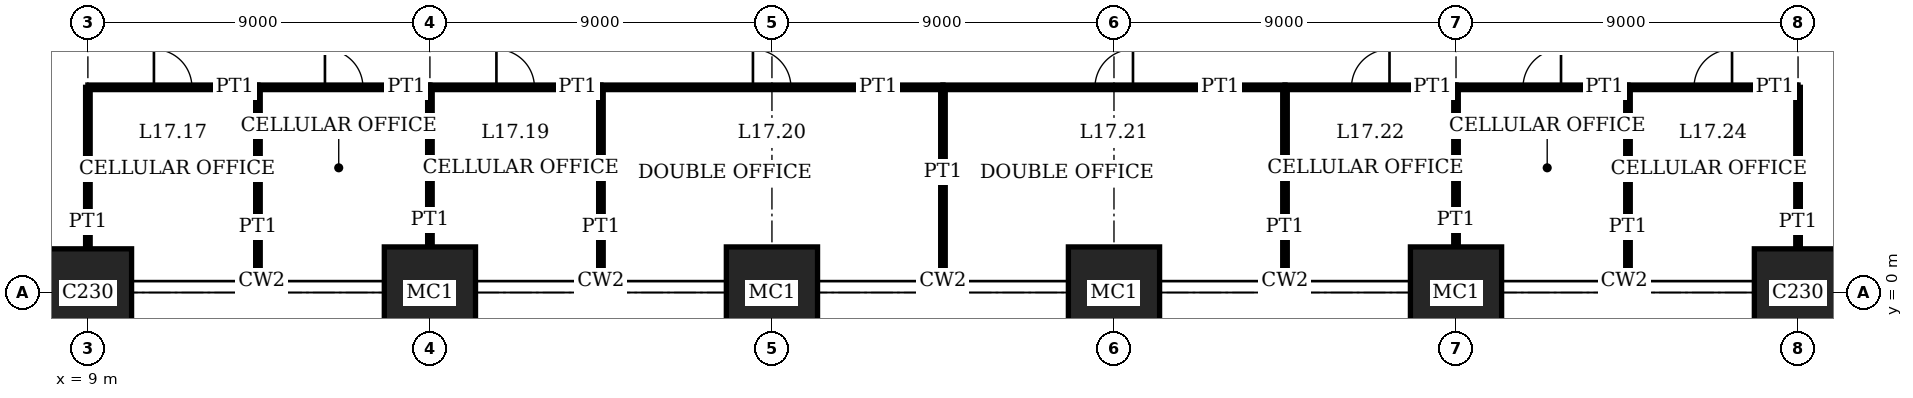
"""IFC4 building model, lengths in metres.
Left out: names, types, materials, properties, quantities, classifications, styles, units other than length and angle.
Written with IfcOpenShell. Run it as: python <this file> out.ifc"""

import sys

from ifc_helpers import new_model, si_unit, direction, frame, frame_2d, origin, origin_2d, place, context, subcontext, project, spatial, rectangle, extrude, element, fill, save


model = new_model("IFC4")
c1 = context("Model", 3, precision=1e-05, world=origin(), true_north=direction((0.0, 1.0)))
c2 = subcontext(c1, "Body", "Model", "MODEL_VIEW")
j1 = project(units=[si_unit("LENGTHUNIT", "METRE"), si_unit("PLANEANGLEUNIT", "RADIAN")], contexts=[c1])
p1 = place(None, origin())
s1 = spatial("IfcSite", under=j1, at=p1, CompositionType="ELEMENT")
p2 = place(p1, origin())
s2 = spatial("IfcBuilding", under=s1, at=p2, CompositionType="ELEMENT")
p3 = place(p2, frame((0.0, 0.0, 71.8)))
s3 = spatial("IfcBuildingStorey", under=s2, at=p3, CompositionType="ELEMENT", Elevation=71.8)
p4 = place(p3, frame((9.0, 0.0, 0.0), z_axis=(0.0, 0.0, 1.0), x_axis=(1.0, 0.0, 0.0)))
e1 = element("IfcColumn", 1, at=p4, inside=s3, PredefinedType="COLUMN", context=c2, shape_type="SweptSolid", body=[
    extrude(rectangle(XDim=2.3, YDim=2.3, at=origin_2d()), origin(), (0.0, 0.0, 1.0), 4.0),
])
for number, where, z_axis, x_axis in (
    (2, (18.0, 0.0, 0.0), (0.0, 0.0, 1.0), (1.0, 0.0, 0.0)),
    (3, (27.0, 0.0, 0.0), (0.0, 0.0, 1.0), (1.0, 0.0, 0.0)),
    (4, (36.0, 0.0, 0.0), (0.0, 0.0, 1.0), (1.0, 0.0, 0.0)),
    (5, (45.0, 0.0, 0.0), (0.0, 0.0, 1.0), (1.0, 0.0, 0.0)),
):
    element("IfcColumn", number, at=place(p3, frame(where, z_axis=z_axis, x_axis=x_axis)), inside=s3, PredefinedType="COLUMN", context=c2, shape_type="SweptSolid", body=[
        extrude(rectangle(XDim=2.4, YDim=2.4, at=origin_2d()), origin(), (0.0, 0.0, 1.0), 4.0),
    ])
p5 = place(p3, frame((54.0, 0.0, 0.0), z_axis=(0.0, 0.0, 1.0), x_axis=(1.0, 0.0, 0.0)))
e6 = element("IfcColumn", 6, at=p5, inside=s3, PredefinedType="COLUMN", context=c2, shape_type="SweptSolid", body=[
    extrude(rectangle(XDim=2.3, YDim=2.3, at=origin_2d()), origin(), (0.0, 0.0, 1.0), 4.0),
])
p6 = place(p3, frame((9.0, 5.4, 0.0), z_axis=(0.0, 0.0, 1.0), x_axis=(1.0, 0.0, 0.0)))
e7 = element("IfcWall", 7, at=p6, inside=s3, PredefinedType="PARTITIONING", context=c2, shape_type="SweptSolid", body=[
    extrude(rectangle(XDim=4.475, YDim=0.12, at=frame_2d((2.238, 0.0))), origin(), (0.0, 0.0, 1.0), 3.75),
])
p7 = place(p6, frame((1.738, 0.0, 0.0)))
e8 = element("IfcOpeningElement", 8, at=p7, cuts=e7, PredefinedType="OPENING", context=c2, shape_type="SweptSolid", body=[
    extrude(rectangle(XDim=1.0, YDim=2.4, at=frame_2d((0.5, 1.2))), frame((0.0, 0.07, 0.0), z_axis=(0.0, -1.0, 0.0), x_axis=(1.0, 0.0, 0.0)), (0.0, 0.0, 1.0), 0.14),
])
p8 = place(p3, frame((13.475, 5.4, 0.0), z_axis=(0.0, 0.0, 1.0), x_axis=(1.0, 0.0, 0.0)))
e9 = element("IfcWall", 9, at=p8, inside=s3, PredefinedType="PARTITIONING", context=c2, shape_type="SweptSolid", body=[
    extrude(rectangle(XDim=4.525, YDim=0.12, at=frame_2d((2.262, 0.0))), origin(), (0.0, 0.0, 1.0), 3.75),
])
p9 = place(p8, frame((1.763, 0.0, 0.0)))
e10 = element("IfcOpeningElement", 10, at=p9, cuts=e9, PredefinedType="OPENING", context=c2, shape_type="SweptSolid", body=[
    extrude(rectangle(XDim=1.0, YDim=2.4, at=frame_2d((0.5, 1.2))), frame((0.0, 0.07, 0.0), z_axis=(0.0, -1.0, 0.0), x_axis=(1.0, 0.0, 0.0)), (0.0, 0.0, 1.0), 0.14),
])
p10 = place(p3, frame((18.0, 5.4, 0.0), z_axis=(0.0, 0.0, 1.0), x_axis=(1.0, 0.0, 0.0)))
e11 = element("IfcWall", 11, at=p10, inside=s3, PredefinedType="PARTITIONING", context=c2, shape_type="SweptSolid", body=[
    extrude(rectangle(XDim=4.5, YDim=0.12, at=frame_2d((2.25, 0.0))), origin(), (0.0, 0.0, 1.0), 3.75),
])
p11 = place(p10, frame((1.75, 0.0, 0.0)))
e12 = element("IfcOpeningElement", 12, at=p11, cuts=e11, PredefinedType="OPENING", context=c2, shape_type="SweptSolid", body=[
    extrude(rectangle(XDim=1.0, YDim=2.4, at=frame_2d((0.5, 1.2))), frame((0.0, 0.07, 0.0), z_axis=(0.0, -1.0, 0.0), x_axis=(1.0, 0.0, 0.0)), (0.0, 0.0, 1.0), 0.14),
])
p12 = place(p3, frame((22.5, 5.4, 0.0), z_axis=(0.0, 0.0, 1.0), x_axis=(1.0, 0.0, 0.0)))
e13 = element("IfcWall", 13, at=p12, inside=s3, PredefinedType="PARTITIONING", context=c2, shape_type="SweptSolid", body=[
    extrude(rectangle(XDim=9.0, YDim=0.12, at=frame_2d((4.5, 0.0))), origin(), (0.0, 0.0, 1.0), 3.75),
])
p13 = place(p12, frame((4.0, 0.0, 0.0)))
e14 = element("IfcOpeningElement", 14, at=p13, cuts=e13, PredefinedType="OPENING", context=c2, shape_type="SweptSolid", body=[
    extrude(rectangle(XDim=1.0, YDim=2.4, at=frame_2d((0.5, 1.2))), frame((0.0, 0.07, 0.0), z_axis=(0.0, -1.0, 0.0), x_axis=(1.0, 0.0, 0.0)), (0.0, 0.0, 1.0), 0.14),
])
p14 = place(p3, frame((31.5, 5.4, 0.0), z_axis=(0.0, 0.0, 1.0), x_axis=(1.0, 0.0, 0.0)))
e15 = element("IfcWall", 15, at=p14, inside=s3, PredefinedType="PARTITIONING", context=c2, shape_type="SweptSolid", body=[
    extrude(rectangle(XDim=9.0, YDim=0.12, at=frame_2d((4.5, 0.0))), origin(), (0.0, 0.0, 1.0), 3.75),
])
p15 = place(p14, frame((4.0, 0.0, 0.0)))
e16 = element("IfcOpeningElement", 16, at=p15, cuts=e15, PredefinedType="OPENING", context=c2, shape_type="SweptSolid", body=[
    extrude(rectangle(XDim=1.0, YDim=2.4, at=frame_2d((0.5, 1.2))), frame((0.0, 0.07, 0.0), z_axis=(0.0, -1.0, 0.0), x_axis=(1.0, 0.0, 0.0)), (0.0, 0.0, 1.0), 0.14),
])
p16 = place(p3, frame((40.5, 5.4, 0.0), z_axis=(0.0, 0.0, 1.0), x_axis=(1.0, 0.0, 0.0)))
e17 = element("IfcWall", 17, at=p16, inside=s3, PredefinedType="PARTITIONING", context=c2, shape_type="SweptSolid", body=[
    extrude(rectangle(XDim=4.5, YDim=0.12, at=frame_2d((2.25, 0.0))), origin(), (0.0, 0.0, 1.0), 3.75),
])
p17 = place(p16, frame((1.75, 0.0, 0.0)))
e18 = element("IfcOpeningElement", 18, at=p17, cuts=e17, PredefinedType="OPENING", context=c2, shape_type="SweptSolid", body=[
    extrude(rectangle(XDim=1.0, YDim=2.4, at=frame_2d((0.5, 1.2))), frame((0.0, 0.07, 0.0), z_axis=(0.0, -1.0, 0.0), x_axis=(1.0, 0.0, 0.0)), (0.0, 0.0, 1.0), 0.14),
])
p18 = place(p3, frame((45.0, 5.4, 0.0), z_axis=(0.0, 0.0, 1.0), x_axis=(1.0, 0.0, 0.0)))
e19 = element("IfcWall", 19, at=p18, inside=s3, PredefinedType="PARTITIONING", context=c2, shape_type="SweptSolid", body=[
    extrude(rectangle(XDim=4.525, YDim=0.12, at=frame_2d((2.262, 0.0))), origin(), (0.0, 0.0, 1.0), 3.75),
])
p19 = place(p18, frame((1.763, 0.0, 0.0)))
e20 = element("IfcOpeningElement", 20, at=p19, cuts=e19, PredefinedType="OPENING", context=c2, shape_type="SweptSolid", body=[
    extrude(rectangle(XDim=1.0, YDim=2.4, at=frame_2d((0.5, 1.2))), frame((0.0, 0.07, 0.0), z_axis=(0.0, -1.0, 0.0), x_axis=(1.0, 0.0, 0.0)), (0.0, 0.0, 1.0), 0.14),
])
p20 = place(p3, frame((49.525, 5.4, 0.0), z_axis=(0.0, 0.0, 1.0), x_axis=(1.0, 0.0, 0.0)))
e21 = element("IfcWall", 21, at=p20, inside=s3, PredefinedType="PARTITIONING", context=c2, shape_type="SweptSolid", body=[
    extrude(rectangle(XDim=4.475, YDim=0.12, at=frame_2d((2.238, 0.0))), origin(), (0.0, 0.0, 1.0), 3.75),
])
p21 = place(p20, frame((1.738, 0.0, 0.0)))
e22 = element("IfcOpeningElement", 22, at=p21, cuts=e21, PredefinedType="OPENING", context=c2, shape_type="SweptSolid", body=[
    extrude(rectangle(XDim=1.0, YDim=2.4, at=frame_2d((0.5, 1.2))), frame((0.0, 0.07, 0.0), z_axis=(0.0, -1.0, 0.0), x_axis=(1.0, 0.0, 0.0)), (0.0, 0.0, 1.0), 0.14),
])
p22 = place(p3, frame((9.0, 1.15, 0.0), z_axis=(0.0, 0.0, 1.0), x_axis=(0.0, 1.0, 0.0)))
e23 = element("IfcWall", 23, at=p22, inside=s3, PredefinedType="PARTITIONING", context=c2, shape_type="SweptSolid", body=[
    extrude(rectangle(XDim=4.25, YDim=0.12, at=frame_2d((2.125, 0.0))), origin(), (0.0, 0.0, 1.0), 3.05),
])
p23 = place(p3, frame((13.475, 0.31, 0.0), z_axis=(0.0, 0.0, 1.0), x_axis=(0.0, 1.0, 0.0)))
e24 = element("IfcWall", 24, at=p23, inside=s3, PredefinedType="PARTITIONING", context=c2, shape_type="SweptSolid", body=[
    extrude(rectangle(XDim=5.09, YDim=0.12, at=frame_2d((2.545, 0.0))), origin(), (0.0, 0.0, 1.0), 3.75),
])
p24 = place(p3, frame((18.0, 1.2, 0.0), z_axis=(0.0, 0.0, 1.0), x_axis=(0.0, 1.0, 0.0)))
e25 = element("IfcWall", 25, at=p24, inside=s3, PredefinedType="PARTITIONING", context=c2, shape_type="SweptSolid", body=[
    extrude(rectangle(XDim=4.2, YDim=0.12, at=frame_2d((2.1, 0.0))), origin(), (0.0, 0.0, 1.0), 3.05),
])
for number, where, z_axis, x_axis in (
    (26, (22.5, 0.31, 0.0), (0.0, 0.0, 1.0), (0.0, 1.0, 0.0)),
    (27, (31.5, 0.31, 0.0), (0.0, 0.0, 1.0), (0.0, 1.0, 0.0)),
    (28, (40.5, 0.31, 0.0), (0.0, 0.0, 1.0), (0.0, 1.0, 0.0)),
):
    element("IfcWall", number, at=place(p3, frame(where, z_axis=z_axis, x_axis=x_axis)), inside=s3, PredefinedType="PARTITIONING", context=c2, shape_type="SweptSolid", body=[
        extrude(rectangle(XDim=5.09, YDim=0.12, at=frame_2d((2.545, 0.0))), origin(), (0.0, 0.0, 1.0), 3.75),
    ])
p25 = place(p3, frame((45.0, 1.2, 0.0), z_axis=(0.0, 0.0, 1.0), x_axis=(0.0, 1.0, 0.0)))
e29 = element("IfcWall", 29, at=p25, inside=s3, PredefinedType="PARTITIONING", context=c2, shape_type="SweptSolid", body=[
    extrude(rectangle(XDim=4.2, YDim=0.12, at=frame_2d((2.1, 0.0))), origin(), (0.0, 0.0, 1.0), 3.05),
])
p26 = place(p3, frame((49.525, 0.31, 0.0), z_axis=(0.0, 0.0, 1.0), x_axis=(0.0, 1.0, 0.0)))
e30 = element("IfcWall", 30, at=p26, inside=s3, PredefinedType="PARTITIONING", context=c2, shape_type="SweptSolid", body=[
    extrude(rectangle(XDim=5.09, YDim=0.12, at=frame_2d((2.545, 0.0))), origin(), (0.0, 0.0, 1.0), 3.75),
])
p27 = place(p3, frame((54.0, 1.15, 0.0), z_axis=(0.0, 0.0, 1.0), x_axis=(0.0, 1.0, 0.0)))
e31 = element("IfcWall", 31, at=p27, inside=s3, PredefinedType="PARTITIONING", context=c2, shape_type="SweptSolid", body=[
    extrude(rectangle(XDim=4.25, YDim=0.12, at=frame_2d((2.125, 0.0))), origin(), (0.0, 0.0, 1.0), 3.05),
])
p28 = place(p7, origin())
e32 = element("IfcDoor", 32, at=p28, inside=s3, OperationType="SINGLE_SWING_RIGHT", PredefinedType="DOOR", context=c2, shape_type="SweptSolid", body=[
    extrude(rectangle(XDim=1.0, YDim=2.4, at=frame_2d((0.5, 1.2))), frame((0.0, 0.025, 0.0), z_axis=(0.0, -1.0, 0.0), x_axis=(1.0, 0.0, 0.0)), (0.0, 0.0, 1.0), 0.05),
])
fill(e8, e32)
p29 = place(p9, origin())
e33 = element("IfcDoor", 33, at=p29, inside=s3, OperationType="SINGLE_SWING_RIGHT", PredefinedType="DOOR", context=c2, shape_type="SweptSolid", body=[
    extrude(rectangle(XDim=1.0, YDim=2.4, at=frame_2d((0.5, 1.2))), frame((0.0, 0.025, 0.0), z_axis=(0.0, -1.0, 0.0), x_axis=(1.0, 0.0, 0.0)), (0.0, 0.0, 1.0), 0.05),
])
fill(e10, e33)
p30 = place(p11, origin())
e34 = element("IfcDoor", 34, at=p30, inside=s3, OperationType="SINGLE_SWING_RIGHT", PredefinedType="DOOR", context=c2, shape_type="SweptSolid", body=[
    extrude(rectangle(XDim=1.0, YDim=2.4, at=frame_2d((0.5, 1.2))), frame((0.0, 0.025, 0.0), z_axis=(0.0, -1.0, 0.0), x_axis=(1.0, 0.0, 0.0)), (0.0, 0.0, 1.0), 0.05),
])
fill(e12, e34)
p31 = place(p13, origin())
e35 = element("IfcDoor", 35, at=p31, inside=s3, OperationType="SINGLE_SWING_RIGHT", PredefinedType="DOOR", context=c2, shape_type="SweptSolid", body=[
    extrude(rectangle(XDim=1.0, YDim=2.4, at=frame_2d((0.5, 1.2))), frame((0.0, 0.025, 0.0), z_axis=(0.0, -1.0, 0.0), x_axis=(1.0, 0.0, 0.0)), (0.0, 0.0, 1.0), 0.05),
])
fill(e14, e35)
p32 = place(p15, origin())
e36 = element("IfcDoor", 36, at=p32, inside=s3, OperationType="SINGLE_SWING_LEFT", PredefinedType="DOOR", context=c2, shape_type="SweptSolid", body=[
    extrude(rectangle(XDim=1.0, YDim=2.4, at=frame_2d((0.5, 1.2))), frame((0.0, 0.025, 0.0), z_axis=(0.0, -1.0, 0.0), x_axis=(1.0, 0.0, 0.0)), (0.0, 0.0, 1.0), 0.05),
])
fill(e16, e36)
p33 = place(p17, origin())
e37 = element("IfcDoor", 37, at=p33, inside=s3, OperationType="SINGLE_SWING_LEFT", PredefinedType="DOOR", context=c2, shape_type="SweptSolid", body=[
    extrude(rectangle(XDim=1.0, YDim=2.4, at=frame_2d((0.5, 1.2))), frame((0.0, 0.025, 0.0), z_axis=(0.0, -1.0, 0.0), x_axis=(1.0, 0.0, 0.0)), (0.0, 0.0, 1.0), 0.05),
])
fill(e18, e37)
p34 = place(p19, origin())
e38 = element("IfcDoor", 38, at=p34, inside=s3, OperationType="SINGLE_SWING_LEFT", PredefinedType="DOOR", context=c2, shape_type="SweptSolid", body=[
    extrude(rectangle(XDim=1.0, YDim=2.4, at=frame_2d((0.5, 1.2))), frame((0.0, 0.025, 0.0), z_axis=(0.0, -1.0, 0.0), x_axis=(1.0, 0.0, 0.0)), (0.0, 0.0, 1.0), 0.05),
])
fill(e20, e38)
p35 = place(p21, origin())
e39 = element("IfcDoor", 39, at=p35, inside=s3, OperationType="SINGLE_SWING_LEFT", PredefinedType="DOOR", context=c2, shape_type="SweptSolid", body=[
    extrude(rectangle(XDim=1.0, YDim=2.4, at=frame_2d((0.5, 1.2))), frame((0.0, 0.025, 0.0), z_axis=(0.0, -1.0, 0.0), x_axis=(1.0, 0.0, 0.0)), (0.0, 0.0, 1.0), 0.05),
])
fill(e22, e39)
save(model, sys.argv[1])
